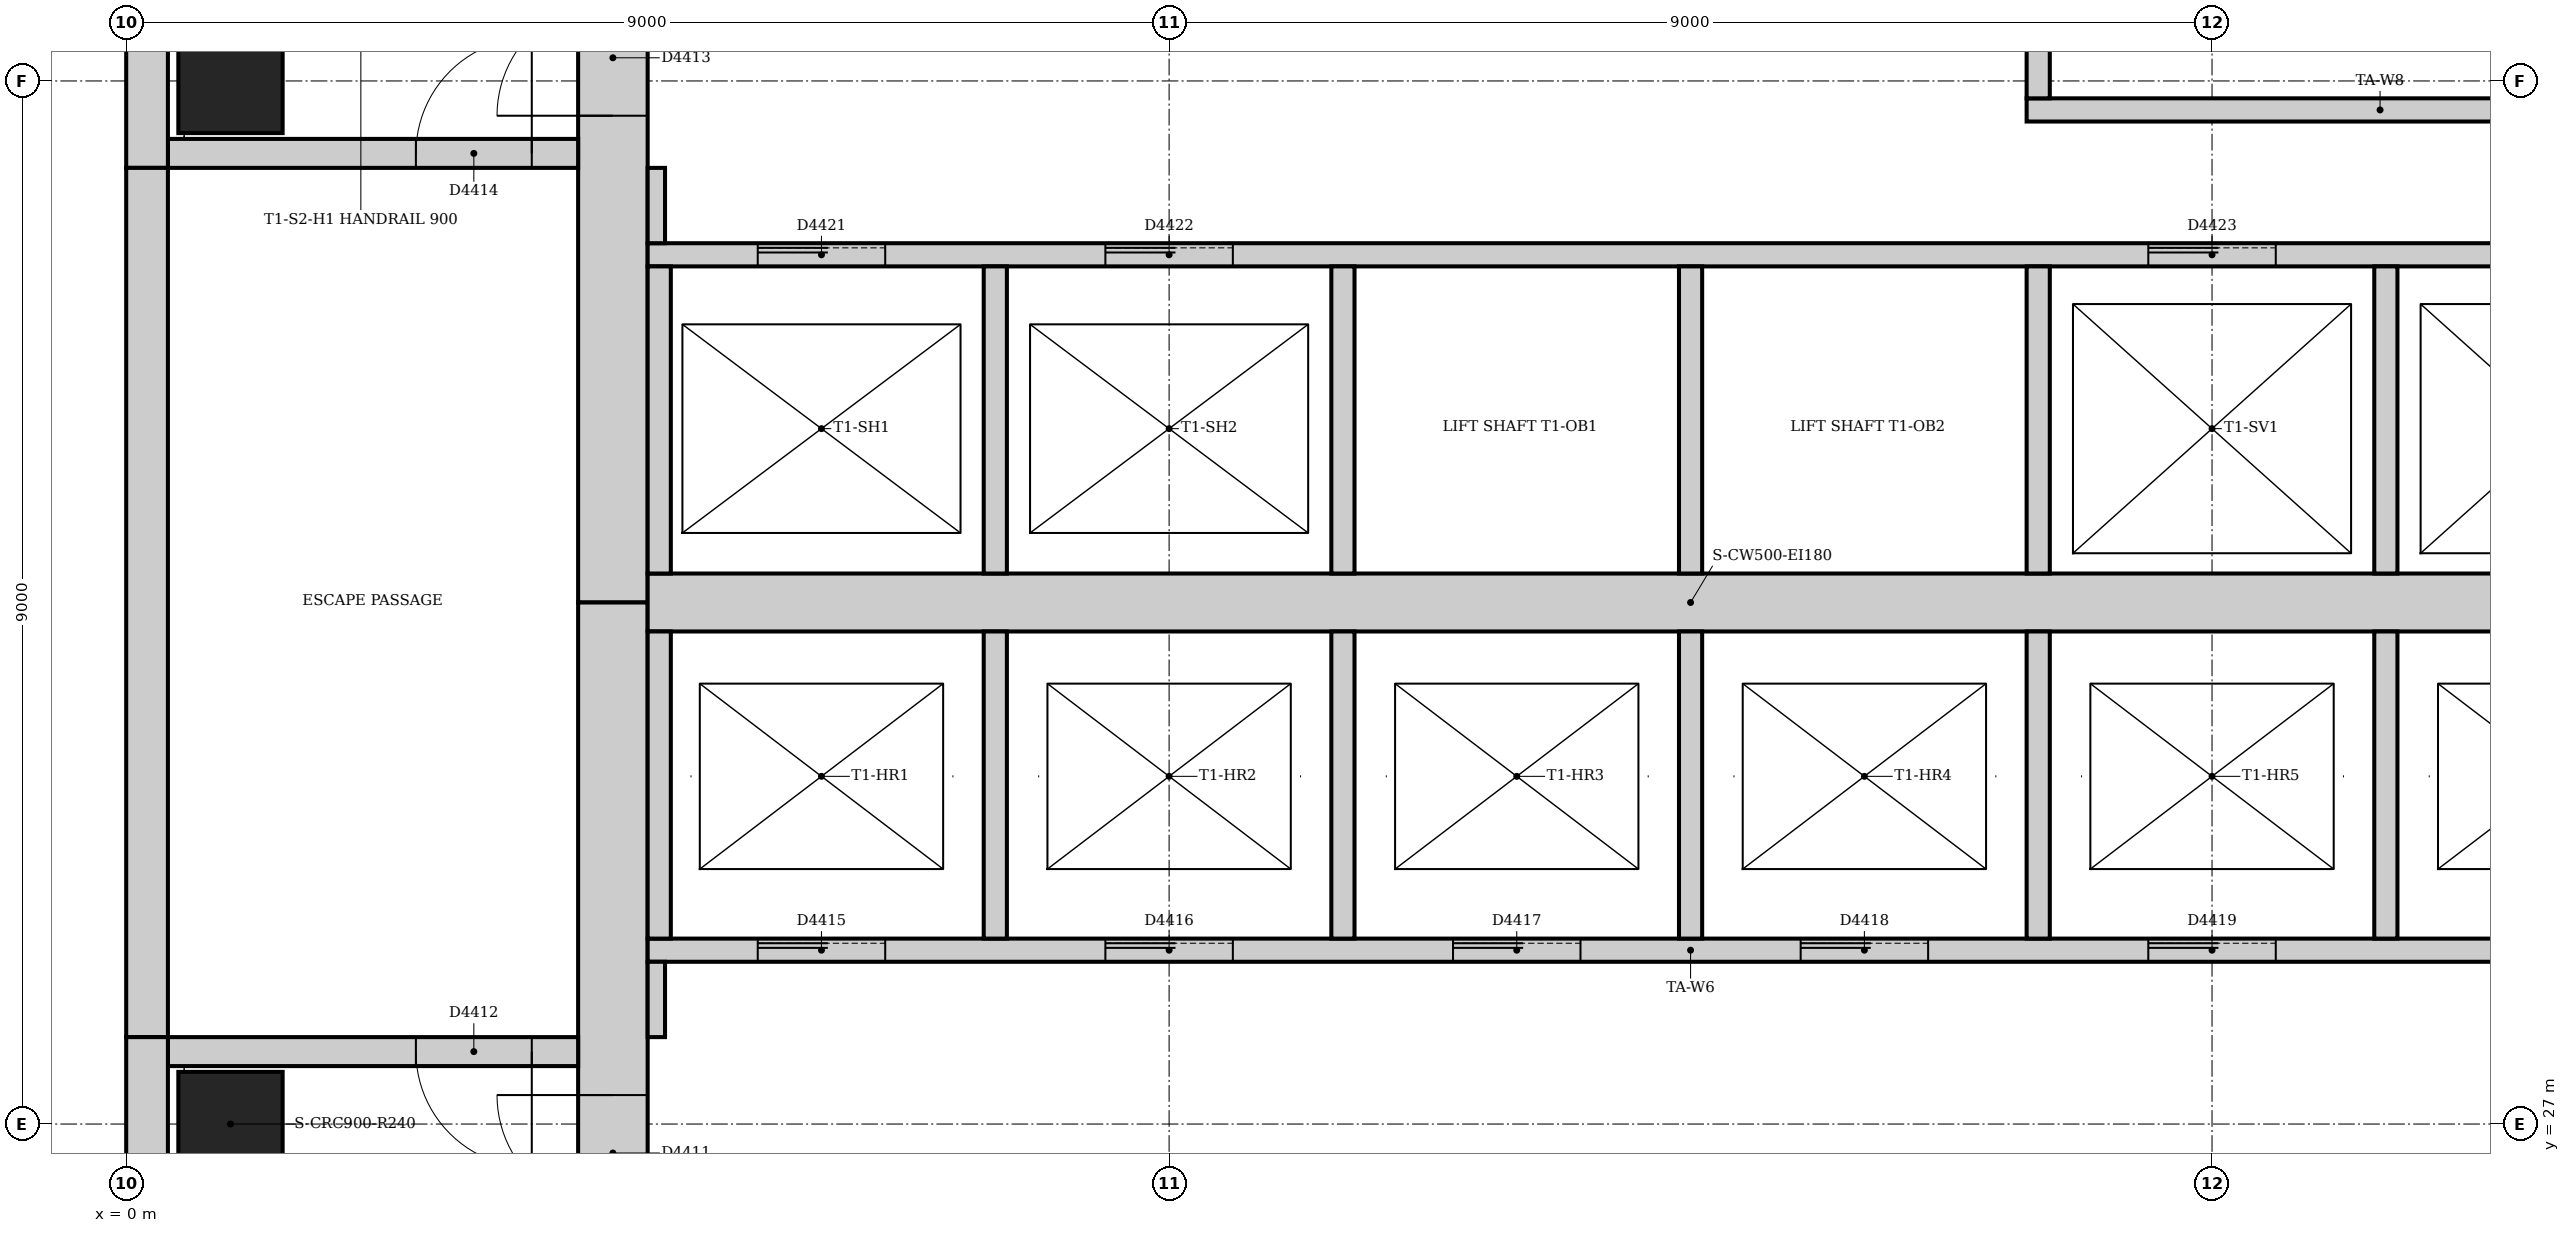
"""IFC4 building model, lengths in metres.
Left out: names, types, materials, properties, quantities, classifications, styles, units other than length and angle.
Written with IfcOpenShell. Run it as: python <this file> out.ifc"""

import sys

from ifc_helpers import new_model, si_unit, direction, frame, frame_2d, origin, origin_2d, place, context, subcontext, project, spatial, rectangle, extrude, element, fill, save


model = new_model("IFC4")
c1 = context("Model", 3, precision=1e-05, world=origin(), true_north=direction((0.0, 1.0)))
c2 = subcontext(c1, "Body", "Model", "MODEL_VIEW")
j1 = project(units=[si_unit("LENGTHUNIT", "METRE"), si_unit("PLANEANGLEUNIT", "RADIAN")], contexts=[c1])
p1 = place(None, origin())
s1 = spatial("IfcSite", under=j1, at=p1, CompositionType="ELEMENT")
p2 = place(p1, origin())
s2 = spatial("IfcBuilding", under=s1, at=p2, CompositionType="ELEMENT")
p3 = place(p2, frame((0.0, 0.0, 149.0)))
s3 = spatial("IfcBuildingStorey", under=s2, at=p3, CompositionType="ELEMENT", Elevation=149.0)
p4 = place(p3, frame((4.2, 42.0, 0.0), z_axis=(0.0, 0.0, 1.0), x_axis=(0.0, -1.0, 0.0)))
e1 = element("IfcWall", 1, at=p4, inside=s3, PredefinedType="SOLIDWALL", context=c2, shape_type="SweptSolid", body=[
    extrude(rectangle(XDim=10.5, YDim=0.6, at=frame_2d((5.25, 0.0))), origin(), (0.0, 0.0, 1.0), 4.0),
])
p5 = place(p4, frame((5.3, 0.0, 0.0)))
e2 = element("IfcOpeningElement", 2, at=p5, cuts=e1, PredefinedType="OPENING", context=c2, shape_type="SweptSolid", body=[
    extrude(rectangle(XDim=1.0, YDim=2.1, at=frame_2d((0.5, 1.05))), frame((0.0, 0.31, 0.0), z_axis=(0.0, -1.0, 0.0), x_axis=(1.0, 0.0, 0.0)), (0.0, 0.0, 1.0), 0.62),
])
p6 = place(p3, frame((4.2, 31.5, 0.0), z_axis=(0.0, 0.0, 1.0), x_axis=(0.0, -1.0, 0.0)))
e3 = element("IfcWall", 3, at=p6, inside=s3, PredefinedType="SOLIDWALL", context=c2, shape_type="SweptSolid", body=[
    extrude(rectangle(XDim=10.5, YDim=0.6, at=frame_2d((5.25, 0.0))), origin(), (0.0, 0.0, 1.0), 4.0),
])
p7 = place(p6, frame((4.25, 0.0, 0.0)))
e4 = element("IfcOpeningElement", 4, at=p7, cuts=e3, PredefinedType="OPENING", context=c2, shape_type="SweptSolid", body=[
    extrude(rectangle(XDim=1.0, YDim=2.1, at=frame_2d((0.5, 1.05))), frame((0.0, 0.31, 0.0), z_axis=(0.0, -1.0, 0.0), x_axis=(1.0, 0.0, 0.0)), (0.0, 0.0, 1.0), 0.62),
])
p8 = place(p3, frame((4.5, 31.5, 0.0), z_axis=(0.0, 0.0, 1.0), x_axis=(1.0, 0.0, 0.0)))
e5 = element("IfcWall", 5, at=p8, inside=s3, PredefinedType="SOLIDWALL", context=c2, shape_type="SweptSolid", body=[
    extrude(rectangle(XDim=18.0, YDim=0.5, at=frame_2d((9.0, 0.0))), origin(), (0.0, 0.0, 1.0), 4.0),
])
p9 = place(p3, frame((3.9, 27.625, 0.0), z_axis=(0.0, 0.0, 1.0), x_axis=(-1.0, 0.0, 0.0)))
e6 = element("IfcWall", 6, at=p9, inside=s3, PredefinedType="SOLIDWALL", context=c2, shape_type="SweptSolid", body=[
    extrude(rectangle(XDim=3.54, YDim=0.25, at=frame_2d((1.77, 0.0))), origin(), (0.0, 0.0, 1.0), 4.0),
])
p10 = place(p9, frame((0.4, 0.0, 0.0)))
e7 = element("IfcOpeningElement", 7, at=p10, cuts=e6, PredefinedType="OPENING", context=c2, shape_type="SweptSolid", body=[
    extrude(rectangle(XDim=1.0, YDim=2.1, at=frame_2d((0.5, 1.05))), frame((0.0, 0.135, 0.0), z_axis=(0.0, -1.0, 0.0), x_axis=(1.0, 0.0, 0.0)), (0.0, 0.0, 1.0), 0.27),
])
p11 = place(p3, frame((0.36, 35.375, 0.0), z_axis=(0.0, 0.0, 1.0), x_axis=(1.0, 0.0, 0.0)))
e8 = element("IfcWall", 8, at=p11, inside=s3, PredefinedType="SOLIDWALL", context=c2, shape_type="SweptSolid", body=[
    extrude(rectangle(XDim=3.54, YDim=0.25, at=frame_2d((1.77, 0.0))), origin(), (0.0, 0.0, 1.0), 4.0),
])
p12 = place(p11, frame((2.14, 0.0, 0.0)))
e9 = element("IfcOpeningElement", 9, at=p12, cuts=e8, PredefinedType="OPENING", context=c2, shape_type="SweptSolid", body=[
    extrude(rectangle(XDim=1.0, YDim=2.1, at=frame_2d((0.5, 1.05))), frame((0.0, 0.135, 0.0), z_axis=(0.0, -1.0, 0.0), x_axis=(1.0, 0.0, 0.0)), (0.0, 0.0, 1.0), 0.27),
])
for number, where, z_axis, x_axis in (
    (10, (0.9, 27.0, 0.0), (0.0, 0.0, 1.0), (1.0, 0.0, 0.0)),
    (11, (0.9, 36.0, 0.0), (0.0, 0.0, 1.0), (1.0, 0.0, 0.0)),
):
    element("IfcColumn", number, at=place(p3, frame(where, z_axis=z_axis, x_axis=x_axis)), inside=s3, PredefinedType="COLUMN", context=c2, shape_type="SweptSolid", body=[
        extrude(rectangle(XDim=0.9, YDim=0.9, at=origin_2d()), origin(), (0.0, 0.0, 1.0), 4.0),
    ])
p13 = place(p3, frame((0.18, 42.0, 0.0), z_axis=(0.0, 0.0, 1.0), x_axis=(0.0, -1.0, 0.0)))
e12 = element("IfcWall", 12, at=p13, inside=s3, PredefinedType="STANDARD", context=c2, shape_type="SweptSolid", body=[
    extrude(rectangle(XDim=6.75, YDim=0.36, at=frame_2d((3.375, 0.0))), origin(), (0.0, 0.0, 1.0), 3.85),
])
p14 = place(p3, frame((0.18, 35.25, 0.0), z_axis=(0.0, 0.0, 1.0), x_axis=(0.0, -1.0, 0.0)))
e13 = element("IfcWall", 13, at=p14, inside=s3, PredefinedType="STANDARD", context=c2, shape_type="SweptSolid", body=[
    extrude(rectangle(XDim=7.5, YDim=0.36, at=frame_2d((3.75, 0.0))), origin(), (0.0, 0.0, 1.0), 3.85),
])
p15 = place(p3, frame((0.18, 27.75, 0.0), z_axis=(0.0, 0.0, 1.0), x_axis=(0.0, -1.0, 0.0)))
e14 = element("IfcWall", 14, at=p15, inside=s3, PredefinedType="STANDARD", context=c2, shape_type="SweptSolid", body=[
    extrude(rectangle(XDim=6.75, YDim=0.36, at=frame_2d((3.375, 0.0))), origin(), (0.0, 0.0, 1.0), 3.85),
])
p16 = place(p3, frame((16.4, 35.75, 0.0), z_axis=(0.0, 0.0, 1.0), x_axis=(1.0, 0.0, 0.0)))
e15 = element("IfcWall", 15, at=p16, inside=s3, PredefinedType="PARTITIONING", context=c2, shape_type="SweptSolid", body=[
    extrude(rectangle(XDim=6.1, YDim=0.2, at=frame_2d((3.05, 0.0))), origin(), (0.0, 0.0, 1.0), 3.85),
])
p17 = place(p3, frame((16.5, 35.85, 0.0), z_axis=(0.0, 0.0, 1.0), x_axis=(0.0, 1.0, 0.0)))
e16 = element("IfcWall", 16, at=p17, inside=s3, PredefinedType="PARTITIONING", context=c2, shape_type="SweptSolid", body=[
    extrude(rectangle(XDim=2.55, YDim=0.2, at=frame_2d((1.275, 0.0))), origin(), (0.0, 0.0, 1.0), 3.85),
])
p18 = place(p3, frame((4.5, 28.5, 0.0), z_axis=(0.0, 0.0, 1.0), x_axis=(1.0, 0.0, 0.0)))
e17 = element("IfcWall", 17, at=p18, inside=s3, PredefinedType="PARTITIONING", context=c2, shape_type="SweptSolid", body=[
    extrude(rectangle(XDim=18.0, YDim=0.2, at=frame_2d((9.0, 0.0))), origin(), (0.0, 0.0, 1.0), 3.85),
])
p19 = place(p18, frame((0.95, 0.0, 0.0)))
e18 = element("IfcOpeningElement", 18, at=p19, cuts=e17, PredefinedType="OPENING", context=c2, shape_type="SweptSolid", body=[
    extrude(rectangle(XDim=1.1, YDim=2.1, at=frame_2d((0.55, 1.05))), frame((0.0, 0.11, 0.0), z_axis=(0.0, -1.0, 0.0), x_axis=(1.0, 0.0, 0.0)), (0.0, 0.0, 1.0), 0.22),
])
p20 = place(p18, frame((3.95, 0.0, 0.0)))
e19 = element("IfcOpeningElement", 19, at=p20, cuts=e17, PredefinedType="OPENING", context=c2, shape_type="SweptSolid", body=[
    extrude(rectangle(XDim=1.1, YDim=2.1, at=frame_2d((0.55, 1.05))), frame((0.0, 0.11, 0.0), z_axis=(0.0, -1.0, 0.0), x_axis=(1.0, 0.0, 0.0)), (0.0, 0.0, 1.0), 0.22),
])
p21 = place(p18, frame((6.95, 0.0, 0.0)))
e20 = element("IfcOpeningElement", 20, at=p21, cuts=e17, PredefinedType="OPENING", context=c2, shape_type="SweptSolid", body=[
    extrude(rectangle(XDim=1.1, YDim=2.1, at=frame_2d((0.55, 1.05))), frame((0.0, 0.11, 0.0), z_axis=(0.0, -1.0, 0.0), x_axis=(1.0, 0.0, 0.0)), (0.0, 0.0, 1.0), 0.22),
])
p22 = place(p18, frame((9.95, 0.0, 0.0)))
e21 = element("IfcOpeningElement", 21, at=p22, cuts=e17, PredefinedType="OPENING", context=c2, shape_type="SweptSolid", body=[
    extrude(rectangle(XDim=1.1, YDim=2.1, at=frame_2d((0.55, 1.05))), frame((0.0, 0.11, 0.0), z_axis=(0.0, -1.0, 0.0), x_axis=(1.0, 0.0, 0.0)), (0.0, 0.0, 1.0), 0.22),
])
p23 = place(p18, frame((12.95, 0.0, 0.0)))
e22 = element("IfcOpeningElement", 22, at=p23, cuts=e17, PredefinedType="OPENING", context=c2, shape_type="SweptSolid", body=[
    extrude(rectangle(XDim=1.1, YDim=2.1, at=frame_2d((0.55, 1.05))), frame((0.0, 0.11, 0.0), z_axis=(0.0, -1.0, 0.0), x_axis=(1.0, 0.0, 0.0)), (0.0, 0.0, 1.0), 0.22),
])
p24 = place(p18, frame((15.95, 0.0, 0.0)))
e23 = element("IfcOpeningElement", 23, at=p24, cuts=e17, PredefinedType="OPENING", context=c2, shape_type="SweptSolid", body=[
    extrude(rectangle(XDim=1.1, YDim=2.1, at=frame_2d((0.55, 1.05))), frame((0.0, 0.11, 0.0), z_axis=(0.0, -1.0, 0.0), x_axis=(1.0, 0.0, 0.0)), (0.0, 0.0, 1.0), 0.22),
])
p25 = place(p3, frame((4.5, 34.5, 0.0), z_axis=(0.0, 0.0, 1.0), x_axis=(1.0, 0.0, 0.0)))
e24 = element("IfcWall", 24, at=p25, inside=s3, PredefinedType="PARTITIONING", context=c2, shape_type="SweptSolid", body=[
    extrude(rectangle(XDim=18.0, YDim=0.2, at=frame_2d((9.0, 0.0))), origin(), (0.0, 0.0, 1.0), 3.85),
])
p26 = place(p25, frame((0.95, 0.0, 0.0)))
e25 = element("IfcOpeningElement", 25, at=p26, cuts=e24, PredefinedType="OPENING", context=c2, shape_type="SweptSolid", body=[
    extrude(rectangle(XDim=1.1, YDim=2.1, at=frame_2d((0.55, 1.05))), frame((0.0, 0.11, 0.0), z_axis=(0.0, -1.0, 0.0), x_axis=(1.0, 0.0, 0.0)), (0.0, 0.0, 1.0), 0.22),
])
p27 = place(p25, frame((3.95, 0.0, 0.0)))
e26 = element("IfcOpeningElement", 26, at=p27, cuts=e24, PredefinedType="OPENING", context=c2, shape_type="SweptSolid", body=[
    extrude(rectangle(XDim=1.1, YDim=2.1, at=frame_2d((0.55, 1.05))), frame((0.0, 0.11, 0.0), z_axis=(0.0, -1.0, 0.0), x_axis=(1.0, 0.0, 0.0)), (0.0, 0.0, 1.0), 0.22),
])
p28 = place(p25, frame((12.95, 0.0, 0.0)))
e27 = element("IfcOpeningElement", 27, at=p28, cuts=e24, PredefinedType="OPENING", context=c2, shape_type="SweptSolid", body=[
    extrude(rectangle(XDim=1.1, YDim=2.1, at=frame_2d((0.55, 1.05))), frame((0.0, 0.11, 0.0), z_axis=(0.0, -1.0, 0.0), x_axis=(1.0, 0.0, 0.0)), (0.0, 0.0, 1.0), 0.22),
])
p29 = place(p25, frame((15.95, 0.0, 0.0)))
e28 = element("IfcOpeningElement", 28, at=p29, cuts=e24, PredefinedType="OPENING", context=c2, shape_type="SweptSolid", body=[
    extrude(rectangle(XDim=1.1, YDim=2.1, at=frame_2d((0.55, 1.05))), frame((0.0, 0.11, 0.0), z_axis=(0.0, -1.0, 0.0), x_axis=(1.0, 0.0, 0.0)), (0.0, 0.0, 1.0), 0.22),
])
for number, where, z_axis, x_axis in (
    (29, (4.6, 31.75, 0.0), (0.0, 0.0, 1.0), (0.0, 1.0, 0.0)),
    (30, (4.6, 28.6, 0.0), (0.0, 0.0, 1.0), (0.0, 1.0, 0.0)),
    (31, (7.5, 28.6, 0.0), (0.0, 0.0, 1.0), (0.0, 1.0, 0.0)),
    (32, (7.5, 31.75, 0.0), (0.0, 0.0, 1.0), (0.0, 1.0, 0.0)),
    (33, (10.5, 28.6, 0.0), (0.0, 0.0, 1.0), (0.0, 1.0, 0.0)),
    (34, (10.5, 31.75, 0.0), (0.0, 0.0, 1.0), (0.0, 1.0, 0.0)),
    (35, (13.5, 28.6, 0.0), (0.0, 0.0, 1.0), (0.0, 1.0, 0.0)),
    (36, (13.5, 31.75, 0.0), (0.0, 0.0, 1.0), (0.0, 1.0, 0.0)),
    (37, (16.5, 28.6, 0.0), (0.0, 0.0, 1.0), (0.0, 1.0, 0.0)),
    (38, (16.5, 31.75, 0.0), (0.0, 0.0, 1.0), (0.0, 1.0, 0.0)),
    (39, (19.5, 28.6, 0.0), (0.0, 0.0, 1.0), (0.0, 1.0, 0.0)),
    (40, (19.5, 31.75, 0.0), (0.0, 0.0, 1.0), (0.0, 1.0, 0.0)),
):
    element("IfcWall", number, at=place(p3, frame(where, z_axis=z_axis, x_axis=x_axis)), inside=s3, PredefinedType="PARTITIONING", context=c2, shape_type="SweptSolid", body=[
        extrude(rectangle(XDim=2.65, YDim=0.2, at=frame_2d((1.325, 0.0))), origin(), (0.0, 0.0, 1.0), 3.85),
    ])
for number, where, z_axis, x_axis in (
    (41, (4.575, 27.75, 0.0), (0.0, 0.0, 1.0), (0.0, 1.0, 0.0)),
    (42, (4.575, 34.6, 0.0), (0.0, 0.0, 1.0), (0.0, 1.0, 0.0)),
):
    element("IfcWall", number, at=place(p3, frame(where, z_axis=z_axis, x_axis=x_axis)), inside=s3, PredefinedType="PARTITIONING", context=c2, shape_type="SweptSolid", body=[
        extrude(rectangle(XDim=0.65, YDim=0.15, at=frame_2d((0.325, 0.0))), origin(), (0.0, 0.0, 1.0), 3.85),
    ])
p30 = place(p7, frame((1.0, 0.0, 0.0), z_axis=(0.0, 0.0, 1.0), x_axis=(-1.0, 0.0, 0.0)))
e43 = element("IfcDoor", 43, at=p30, inside=s3, OperationType="SINGLE_SWING_RIGHT", PredefinedType="DOOR", context=c2, shape_type="SweptSolid", body=[
    extrude(rectangle(XDim=1.0, YDim=2.1, at=frame_2d((0.5, 1.05))), frame((0.0, 0.025, 0.0), z_axis=(0.0, -1.0, 0.0), x_axis=(1.0, 0.0, 0.0)), (0.0, 0.0, 1.0), 0.05),
])
fill(e4, e43)
p31 = place(p10, origin())
e44 = element("IfcDoor", 44, at=p31, inside=s3, OperationType="SINGLE_SWING_LEFT", PredefinedType="DOOR", context=c2, shape_type="SweptSolid", body=[
    extrude(rectangle(XDim=1.0, YDim=2.1, at=frame_2d((0.5, 1.05))), frame((0.0, 0.025, 0.0), z_axis=(0.0, -1.0, 0.0), x_axis=(1.0, 0.0, 0.0)), (0.0, 0.0, 1.0), 0.05),
])
fill(e7, e44)
p32 = place(p5, frame((1.0, 0.0, 0.0), z_axis=(0.0, 0.0, 1.0), x_axis=(-1.0, 0.0, 0.0)))
e45 = element("IfcDoor", 45, at=p32, inside=s3, OperationType="SINGLE_SWING_LEFT", PredefinedType="DOOR", context=c2, shape_type="SweptSolid", body=[
    extrude(rectangle(XDim=1.0, YDim=2.1, at=frame_2d((0.5, 1.05))), frame((0.0, 0.025, 0.0), z_axis=(0.0, -1.0, 0.0), x_axis=(1.0, 0.0, 0.0)), (0.0, 0.0, 1.0), 0.05),
])
fill(e2, e45)
p33 = place(p12, origin())
e46 = element("IfcDoor", 46, at=p33, inside=s3, OperationType="SINGLE_SWING_RIGHT", PredefinedType="DOOR", context=c2, shape_type="SweptSolid", body=[
    extrude(rectangle(XDim=1.0, YDim=2.1, at=frame_2d((0.5, 1.05))), frame((0.0, 0.025, 0.0), z_axis=(0.0, -1.0, 0.0), x_axis=(1.0, 0.0, 0.0)), (0.0, 0.0, 1.0), 0.05),
])
fill(e9, e46)
p34 = place(p19, origin())
e47 = element("IfcDoor", 47, at=p34, inside=s3, OperationType="SLIDING_TO_LEFT", PredefinedType="DOOR", context=c2, shape_type="SweptSolid", body=[
    extrude(rectangle(XDim=1.1, YDim=2.1, at=frame_2d((0.55, 1.05))), frame((0.0, 0.025, 0.0), z_axis=(0.0, -1.0, 0.0), x_axis=(1.0, 0.0, 0.0)), (0.0, 0.0, 1.0), 0.05),
])
fill(e18, e47)
p35 = place(p20, origin())
e48 = element("IfcDoor", 48, at=p35, inside=s3, OperationType="SLIDING_TO_LEFT", PredefinedType="DOOR", context=c2, shape_type="SweptSolid", body=[
    extrude(rectangle(XDim=1.1, YDim=2.1, at=frame_2d((0.55, 1.05))), frame((0.0, 0.025, 0.0), z_axis=(0.0, -1.0, 0.0), x_axis=(1.0, 0.0, 0.0)), (0.0, 0.0, 1.0), 0.05),
])
fill(e19, e48)
p36 = place(p21, origin())
e49 = element("IfcDoor", 49, at=p36, inside=s3, OperationType="SLIDING_TO_LEFT", PredefinedType="DOOR", context=c2, shape_type="SweptSolid", body=[
    extrude(rectangle(XDim=1.1, YDim=2.1, at=frame_2d((0.55, 1.05))), frame((0.0, 0.025, 0.0), z_axis=(0.0, -1.0, 0.0), x_axis=(1.0, 0.0, 0.0)), (0.0, 0.0, 1.0), 0.05),
])
fill(e20, e49)
p37 = place(p22, origin())
e50 = element("IfcDoor", 50, at=p37, inside=s3, OperationType="SLIDING_TO_LEFT", PredefinedType="DOOR", context=c2, shape_type="SweptSolid", body=[
    extrude(rectangle(XDim=1.1, YDim=2.1, at=frame_2d((0.55, 1.05))), frame((0.0, 0.025, 0.0), z_axis=(0.0, -1.0, 0.0), x_axis=(1.0, 0.0, 0.0)), (0.0, 0.0, 1.0), 0.05),
])
fill(e21, e50)
p38 = place(p23, origin())
e51 = element("IfcDoor", 51, at=p38, inside=s3, OperationType="SLIDING_TO_LEFT", PredefinedType="DOOR", context=c2, shape_type="SweptSolid", body=[
    extrude(rectangle(XDim=1.1, YDim=2.1, at=frame_2d((0.55, 1.05))), frame((0.0, 0.025, 0.0), z_axis=(0.0, -1.0, 0.0), x_axis=(1.0, 0.0, 0.0)), (0.0, 0.0, 1.0), 0.05),
])
fill(e22, e51)
p39 = place(p26, origin())
e52 = element("IfcDoor", 52, at=p39, inside=s3, OperationType="SLIDING_TO_LEFT", PredefinedType="DOOR", context=c2, shape_type="SweptSolid", body=[
    extrude(rectangle(XDim=1.1, YDim=2.1, at=frame_2d((0.55, 1.05))), frame((0.0, 0.025, 0.0), z_axis=(0.0, -1.0, 0.0), x_axis=(1.0, 0.0, 0.0)), (0.0, 0.0, 1.0), 0.05),
])
fill(e25, e52)
p40 = place(p27, origin())
e53 = element("IfcDoor", 53, at=p40, inside=s3, OperationType="SLIDING_TO_LEFT", PredefinedType="DOOR", context=c2, shape_type="SweptSolid", body=[
    extrude(rectangle(XDim=1.1, YDim=2.1, at=frame_2d((0.55, 1.05))), frame((0.0, 0.025, 0.0), z_axis=(0.0, -1.0, 0.0), x_axis=(1.0, 0.0, 0.0)), (0.0, 0.0, 1.0), 0.05),
])
fill(e26, e53)
p41 = place(p28, origin())
e54 = element("IfcDoor", 54, at=p41, inside=s3, OperationType="SLIDING_TO_LEFT", PredefinedType="DOOR", context=c2, shape_type="SweptSolid", body=[
    extrude(rectangle(XDim=1.1, YDim=2.1, at=frame_2d((0.55, 1.05))), frame((0.0, 0.025, 0.0), z_axis=(0.0, -1.0, 0.0), x_axis=(1.0, 0.0, 0.0)), (0.0, 0.0, 1.0), 0.05),
])
fill(e27, e54)
save(model, sys.argv[1])
